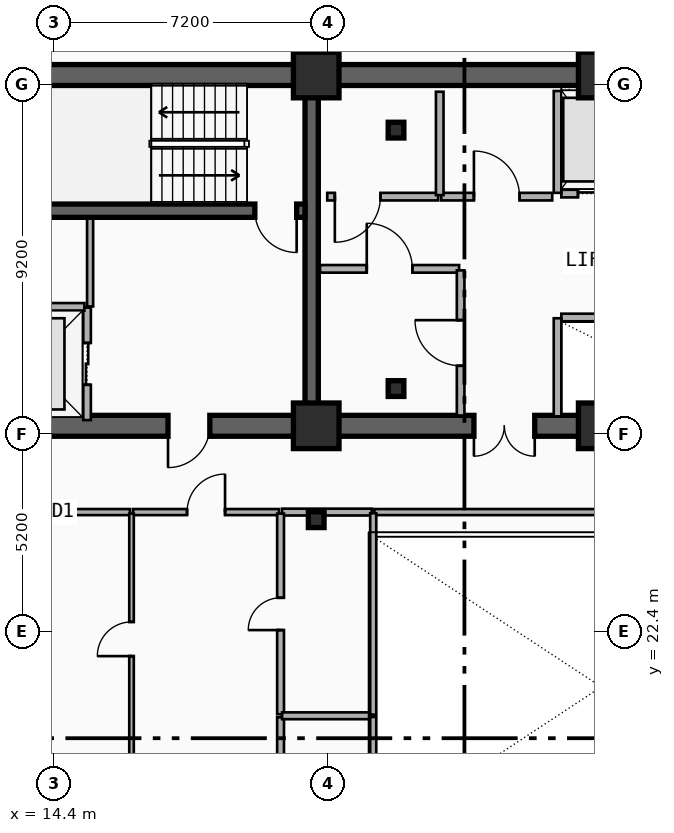
"""IFC4 building model, lengths in metres.
Left out: names, types, materials, properties, quantities, classifications, styles, units other than length and angle.
Written with IfcOpenShell. Run it as: python <this file> out.ifc"""

import sys

from ifc_helpers import new_model, si_unit, direction, frame, frame_2d, origin, origin_2d, place, context, subcontext, project, spatial, rectangle, i_section, extrude, element, fill, save


model = new_model("IFC4")
c1 = context("Model", 3, precision=1e-05, world=origin(), true_north=direction((0.0, 1.0)))
c2 = subcontext(c1, "Body", "Model", "MODEL_VIEW")
j1 = project(units=[si_unit("LENGTHUNIT", "METRE"), si_unit("PLANEANGLEUNIT", "RADIAN")], contexts=[c1])
p1 = place(None, origin())
s1 = spatial("IfcSite", under=j1, at=p1, CompositionType="ELEMENT")
p2 = place(p1, origin())
s2 = spatial("IfcBuilding", under=s1, at=p2, CompositionType="ELEMENT")
p3 = place(p2, frame((0.0, 0.0, 148.35)))
s3 = spatial("IfcBuildingStorey", under=s2, at=p3, CompositionType="ELEMENT", Elevation=148.35)
p4 = place(p3, frame((12.15, 37.05, 0.0), z_axis=(0.0, 0.0, 1.0), x_axis=(1.0, 0.0, 0.0)))
e1 = element("IfcWall", 1, at=p4, inside=s3, PredefinedType="SHEAR", context=c2, shape_type="SweptSolid", body=[
    extrude(rectangle(XDim=33.23, YDim=0.55, at=frame_2d((16.615, 0.0))), origin(), (0.0, 0.0, 1.0), 3.55),
])
p5 = place(p3, frame((21.18, 27.82, 0.0), z_axis=(0.0, 0.0, 1.0), x_axis=(-1.0, 0.0, 0.0)))
e2 = element("IfcWall", 2, at=p5, inside=s3, PredefinedType="SHEAR", context=c2, shape_type="SweptSolid", body=[
    extrude(rectangle(XDim=9.03, YDim=0.55, at=frame_2d((4.515, 0.0))), origin(), (0.0, 0.0, 1.0), 3.55),
])
p6 = place(p5, frame((2.68, 0.0, 0.0)))
e3 = element("IfcOpeningElement", 3, at=p6, cuts=e2, PredefinedType="OPENING", context=c2, shape_type="SweptSolid", body=[
    extrude(rectangle(XDim=1.1, YDim=2.15, at=frame_2d((0.55, 1.075))), frame((0.0, 0.285, 0.0), z_axis=(0.0, -1.0, 0.0), x_axis=(1.0, 0.0, 0.0)), (0.0, 0.0, 1.0), 0.57),
])
p7 = place(p3, frame((33.15, 27.82, 0.0), z_axis=(0.0, 0.0, 1.0), x_axis=(-1.0, 0.0, 0.0)))
e4 = element("IfcWall", 4, at=p7, inside=s3, PredefinedType="SHEAR", context=c2, shape_type="SweptSolid", body=[
    extrude(rectangle(XDim=11.97, YDim=0.55, at=frame_2d((5.985, 0.0))), origin(), (0.0, 0.0, 1.0), 3.55),
])
p8 = place(p7, frame((6.1, 0.0, 0.0)))
e5 = element("IfcOpeningElement", 5, at=p8, cuts=e4, PredefinedType="OPENING", context=c2, shape_type="SweptSolid", body=[
    extrude(rectangle(XDim=1.6, YDim=2.2, at=frame_2d((0.8, 1.1))), frame((0.0, 0.285, 0.0), z_axis=(0.0, -1.0, 0.0), x_axis=(1.0, 0.0, 0.0)), (0.0, 0.0, 1.0), 0.57),
])
p9 = place(p3, frame((21.18, 28.095, 0.0), z_axis=(0.0, 0.0, 1.0), x_axis=(0.0, 1.0, 0.0)))
e6 = element("IfcWall", 6, at=p9, inside=s3, PredefinedType="SHEAR", context=c2, shape_type="SweptSolid", body=[
    extrude(rectangle(XDim=8.68, YDim=0.35, at=frame_2d((4.34, 0.0))), origin(), (0.0, 0.0, 1.0), 3.55),
])
p10 = place(p3, frame((21.005, 33.48, 0.0), z_axis=(0.0, 0.0, 1.0), x_axis=(-1.0, 0.0, 0.0)))
e7 = element("IfcWall", 7, at=p10, inside=s3, PredefinedType="SHEAR", context=c2, shape_type="SweptSolid", body=[
    extrude(rectangle(XDim=8.58, YDim=0.35, at=frame_2d((4.29, 0.0))), origin(), (0.0, 0.0, 1.0), 3.55),
])
p11 = place(p10, frame((0.22, 0.0, 0.0)))
e8 = element("IfcOpeningElement", 8, at=p11, cuts=e7, PredefinedType="OPENING", context=c2, shape_type="SweptSolid", body=[
    extrude(rectangle(XDim=1.1, YDim=2.15, at=frame_2d((0.55, 1.075))), frame((0.0, 0.185, 0.0), z_axis=(0.0, -1.0, 0.0), x_axis=(1.0, 0.0, 0.0)), (0.0, 0.0, 1.0), 0.37),
])
for number, where, z_axis, x_axis in (
    (9, (23.4, 28.8, 0.0), (0.0, 0.0, 1.0), (1.0, 0.0, 0.0)),
    (10, (23.4, 35.6, 0.0), (0.0, 0.0, 1.0), (1.0, 0.0, 0.0)),
):
    element("IfcColumn", number, at=place(p3, frame(where, z_axis=z_axis, x_axis=x_axis)), inside=s3, PredefinedType="COLUMN", context=c2, shape_type="SweptSolid", body=[
        extrude(i_section(OverallWidth=0.413, OverallDepth=0.415, WebThickness=0.03, FlangeThickness=0.047, FilletRadius=0.015, at=origin_2d()), origin(), (0.0, 0.0, 1.0), 3.55),
    ])
for number, where, z_axis, x_axis in (
    (11, (21.3, 27.82, 0.0), (0.0, 0.0, 1.0), (1.0, 0.0, 0.0)),
    (12, (21.3, 37.05, 0.0), (0.0, 0.0, 1.0), (1.0, 0.0, 0.0)),
    (13, (28.8, 27.82, 0.0), (0.0, 0.0, 1.0), (1.0, 0.0, 0.0)),
    (14, (28.8, 37.05, 0.0), (0.0, 0.0, 1.0), (1.0, 0.0, 0.0)),
):
    element("IfcColumn", number, at=place(p3, frame(where, z_axis=z_axis, x_axis=x_axis)), inside=s3, PredefinedType="COLUMN", context=c2, shape_type="SweptSolid", body=[
        extrude(rectangle(XDim=1.2, YDim=1.2, at=origin_2d()), origin(), (0.0, 0.0, 1.0), 3.55),
    ])
p12 = place(p3, frame((21.3, 25.35, 0.0), z_axis=(0.0, 0.0, 1.0), x_axis=(1.0, 0.0, 0.0)))
e15 = element("IfcColumn", 15, at=p12, inside=s3, PredefinedType="COLUMN", context=c2, shape_type="SweptSolid", body=[
    extrude(i_section(OverallWidth=0.413, OverallDepth=0.415, WebThickness=0.03, FlangeThickness=0.047, FilletRadius=0.015, at=origin_2d()), origin(), (0.0, 0.0, 1.0), 3.55),
])
p13 = place(p3, frame((15.27, 27.97, 0.0), z_axis=(0.0, 0.0, 1.0), x_axis=(0.0, 1.0, 0.0)))
e16 = element("IfcWall", 16, at=p13, inside=s3, PredefinedType="PARTITIONING", context=c2, shape_type="SweptSolid", body=[
    extrude(rectangle(XDim=2.96, YDim=0.2, at=frame_2d((1.48, 0.0))), origin(), (0.0, 0.0, 1.0), 2.36),
])
p14 = place(p13, frame((0.93, 0.0, 0.0)))
e17 = element("IfcOpeningElement", 17, at=p14, cuts=e16, PredefinedType="OPENING", context=c2, shape_type="SweptSolid", body=[
    extrude(rectangle(XDim=1.1, YDim=2.15, at=frame_2d((0.55, 1.075))), frame((0.0, 0.11, 0.0), z_axis=(0.0, -1.0, 0.0), x_axis=(1.0, 0.0, 0.0)), (0.0, 0.0, 1.0), 0.22),
])
p15 = place(p3, frame((12.45, 30.95, 0.0), z_axis=(0.0, 0.0, 1.0), x_axis=(1.0, 0.0, 0.0)))
e18 = element("IfcWall", 18, at=p15, inside=s3, PredefinedType="PARTITIONING", context=c2, shape_type="SweptSolid", body=[
    extrude(rectangle(XDim=2.75, YDim=0.2, at=frame_2d((1.375, 0.0))), origin(), (0.0, 0.0, 1.0), 2.36),
])
p16 = place(p3, frame((27.75, 30.67, 0.0), z_axis=(0.0, 0.0, 1.0), x_axis=(1.0, 0.0, 0.0)))
e19 = element("IfcWall", 19, at=p16, inside=s3, PredefinedType="PARTITIONING", context=c2, shape_type="SweptSolid", body=[
    extrude(rectangle(XDim=1.975, YDim=0.2, at=frame_2d((0.988, 0.0))), origin(), (0.0, 0.0, 1.0), 2.36),
])
p17 = place(p3, frame((27.65, 28.07, 0.0), z_axis=(0.0, 0.0, 1.0), x_axis=(0.0, 1.0, 0.0)))
e20 = element("IfcWall", 20, at=p17, inside=s3, PredefinedType="PARTITIONING", context=c2, shape_type="SweptSolid", body=[
    extrude(rectangle(XDim=2.58, YDim=0.2, at=frame_2d((1.29, 0.0))), origin(), (0.0, 0.0, 1.0), 2.36),
])
p18 = place(p3, frame((27.75, 33.93, 0.0), z_axis=(0.0, 0.0, 1.0), x_axis=(1.0, 0.0, 0.0)))
e21 = element("IfcWall", 21, at=p18, inside=s3, PredefinedType="PARTITIONING", context=c2, shape_type="SweptSolid", body=[
    extrude(rectangle(XDim=1.975, YDim=0.2, at=frame_2d((0.988, 0.0))), origin(), (0.0, 0.0, 1.0), 2.36),
])
p19 = place(p18, frame((0.438, 0.0, 0.0)))
e22 = element("IfcOpeningElement", 22, at=p19, cuts=e21, PredefinedType="OPENING", context=c2, shape_type="SweptSolid", body=[
    extrude(rectangle(XDim=1.1, YDim=2.15, at=frame_2d((0.55, 1.075))), frame((0.0, 0.11, 0.0), z_axis=(0.0, -1.0, 0.0), x_axis=(1.0, 0.0, 0.0)), (0.0, 0.0, 1.0), 0.22),
])
p20 = place(p3, frame((27.65, 33.95, 0.0), z_axis=(0.0, 0.0, 1.0), x_axis=(0.0, 1.0, 0.0)))
e23 = element("IfcWall", 23, at=p20, inside=s3, PredefinedType="PARTITIONING", context=c2, shape_type="SweptSolid", body=[
    extrude(rectangle(XDim=2.68, YDim=0.2, at=frame_2d((1.34, 0.0))), origin(), (0.0, 0.0, 1.0), 2.36),
])
p21 = place(p3, frame((21.4, 31.95, 0.0), z_axis=(0.0, 0.0, 1.0), x_axis=(1.0, 0.0, 0.0)))
e24 = element("IfcWall", 24, at=p21, inside=s3, PredefinedType="PARTITIONING", context=c2, shape_type="SweptSolid", body=[
    extrude(rectangle(XDim=3.66, YDim=0.2, at=frame_2d((1.83, 0.0))), origin(), (0.0, 0.0, 1.0), 2.36),
])
p22 = place(p21, frame((1.23, 0.0, 0.0)))
e25 = element("IfcOpeningElement", 25, at=p22, cuts=e24, PredefinedType="OPENING", context=c2, shape_type="SweptSolid", body=[
    extrude(rectangle(XDim=1.2, YDim=2.15, at=frame_2d((0.6, 1.075))), frame((0.0, 0.11, 0.0), z_axis=(0.0, -1.0, 0.0), x_axis=(1.0, 0.0, 0.0)), (0.0, 0.0, 1.0), 0.22),
])
p23 = place(p3, frame((24.51, 33.85, 0.0), z_axis=(0.0, 0.0, 1.0), x_axis=(-1.0, 0.0, 0.0)))
e26 = element("IfcWall", 26, at=p23, inside=s3, PredefinedType="PARTITIONING", context=c2, shape_type="SweptSolid", body=[
    extrude(rectangle(XDim=2.92, YDim=0.2, at=frame_2d((1.46, 0.0))), origin(), (0.0, 0.0, 1.0), 2.36),
])
p24 = place(p23, frame((1.52, 0.0, 0.0)))
e27 = element("IfcOpeningElement", 27, at=p24, cuts=e26, PredefinedType="OPENING", context=c2, shape_type="SweptSolid", body=[
    extrude(rectangle(XDim=1.2, YDim=2.15, at=frame_2d((0.6, 1.075))), frame((0.0, 0.11, 0.0), z_axis=(0.0, -1.0, 0.0), x_axis=(1.0, 0.0, 0.0)), (0.0, 0.0, 1.0), 0.22),
])
p25 = place(p3, frame((24.59, 33.85, 0.0), z_axis=(0.0, 0.0, 1.0), x_axis=(1.0, 0.0, 0.0)))
e28 = element("IfcWall", 28, at=p25, inside=s3, PredefinedType="PARTITIONING", context=c2, shape_type="SweptSolid", body=[
    extrude(rectangle(XDim=2.92, YDim=0.2, at=frame_2d((1.46, 0.0))), origin(), (0.0, 0.0, 1.0), 3.29),
])
p26 = place(p25, frame((0.86, 0.0, 0.0)))
e29 = element("IfcOpeningElement", 29, at=p26, cuts=e28, PredefinedType="OPENING", context=c2, shape_type="SweptSolid", body=[
    extrude(rectangle(XDim=1.2, YDim=2.15, at=frame_2d((0.6, 1.075))), frame((0.0, 0.11, 0.0), z_axis=(0.0, -1.0, 0.0), x_axis=(1.0, 0.0, 0.0)), (0.0, 0.0, 1.0), 0.22),
])
p27 = place(p3, frame((25.1, 28.09, 0.0), z_axis=(0.0, 0.0, 1.0), x_axis=(0.0, 1.0, 0.0)))
e30 = element("IfcWall", 30, at=p27, inside=s3, PredefinedType="PARTITIONING", context=c2, shape_type="SweptSolid", body=[
    extrude(rectangle(XDim=3.82, YDim=0.2, at=frame_2d((1.91, 0.0))), origin(), (0.0, 0.0, 1.0), 2.67),
])
p28 = place(p27, frame((1.31, 0.0, 0.0)))
e31 = element("IfcOpeningElement", 31, at=p28, cuts=e30, PredefinedType="OPENING", context=c2, shape_type="SweptSolid", body=[
    extrude(rectangle(XDim=1.2, YDim=2.15, at=frame_2d((0.6, 1.075))), frame((0.0, 0.11, 0.0), z_axis=(0.0, -1.0, 0.0), x_axis=(1.0, 0.0, 0.0)), (0.0, 0.0, 1.0), 0.22),
])
p29 = place(p3, frame((24.55, 33.89, 0.0), z_axis=(0.0, 0.0, 1.0), x_axis=(0.0, 1.0, 0.0)))
e32 = element("IfcWall", 32, at=p29, inside=s3, PredefinedType="PARTITIONING", context=c2, shape_type="SweptSolid", body=[
    extrude(rectangle(XDim=2.72, YDim=0.2, at=frame_2d((1.36, 0.0))), origin(), (0.0, 0.0, 1.0), 3.29),
])
p30 = place(p3, frame((16.48, 25.55, 0.0), z_axis=(0.0, 0.0, 1.0), x_axis=(1.0, 0.0, 0.0)))
e33 = element("IfcWall", 33, at=p30, inside=s3, PredefinedType="PARTITIONING", context=c2, shape_type="SweptSolid", body=[
    extrude(rectangle(XDim=3.842, YDim=0.16, at=frame_2d((1.921, 0.0))), origin(), (0.0, 0.0, 1.0), 3.29),
])
p31 = place(p30, frame((1.421, 0.0, 0.0)))
e34 = element("IfcOpeningElement", 34, at=p31, cuts=e33, PredefinedType="OPENING", context=c2, shape_type="SweptSolid", body=[
    extrude(rectangle(XDim=1.0, YDim=2.15, at=frame_2d((0.5, 1.075))), frame((0.0, 0.09, 0.0), z_axis=(0.0, -1.0, 0.0), x_axis=(1.0, 0.0, 0.0)), (0.0, 0.0, 1.0), 0.18),
])
p32 = place(p3, frame((20.402, 25.55, 0.0), z_axis=(0.0, 0.0, 1.0), x_axis=(1.0, 0.0, 0.0)))
e35 = element("IfcWall", 35, at=p32, inside=s3, PredefinedType="PLUMBINGWALL", context=c2, shape_type="SweptSolid", body=[
    extrude(rectangle(XDim=2.358, YDim=0.18, at=frame_2d((1.179, 0.0))), origin(), (0.0, 0.0, 1.0), 2.36),
])
p33 = place(p3, frame((12.24, 25.55, 0.0), z_axis=(0.0, 0.0, 1.0), x_axis=(1.0, 0.0, 0.0)))
e36 = element("IfcWall", 36, at=p33, inside=s3, PredefinedType="PARTITIONING", context=c2, shape_type="SweptSolid", body=[
    extrude(rectangle(XDim=4.16, YDim=0.16, at=frame_2d((2.08, 0.0))), origin(), (0.0, 0.0, 1.0), 2.36),
])
p34 = place(p3, frame((20.362, 10.66, 0.0), z_axis=(0.0, 0.0, 1.0), x_axis=(0.0, 1.0, 0.0)))
e37 = element("IfcWall", 37, at=p34, inside=s3, PredefinedType="PLUMBINGWALL", context=c2, shape_type="SweptSolid", body=[
    extrude(rectangle(XDim=9.49, YDim=0.18, at=frame_2d((4.745, 0.0))), origin(), (0.0, 0.0, 1.0), 2.72),
])
p35 = place(p34, frame((4.245, 0.0, 0.0)))
e38 = element("IfcOpeningElement", 38, at=p35, cuts=e37, PredefinedType="OPENING", context=c2, shape_type="SweptSolid", body=[
    extrude(rectangle(XDim=1.0, YDim=2.15, at=frame_2d((0.5, 1.075))), frame((0.0, 0.1, 0.0), z_axis=(0.0, -1.0, 0.0), x_axis=(1.0, 0.0, 0.0)), (0.0, 0.0, 1.0), 0.2),
])
p36 = place(p3, frame((20.362, 20.23, 0.0), z_axis=(0.0, 0.0, 1.0), x_axis=(0.0, 1.0, 0.0)))
e39 = element("IfcWall", 39, at=p36, inside=s3, PredefinedType="PLUMBINGWALL", context=c2, shape_type="SweptSolid", body=[
    extrude(rectangle(XDim=5.28, YDim=0.18, at=frame_2d((2.64, 0.0))), origin(), (0.0, 0.0, 1.0), 2.72),
])
p37 = place(p36, frame((2.215, 0.0, 0.0)))
e40 = element("IfcOpeningElement", 40, at=p37, cuts=e39, PredefinedType="OPENING", context=c2, shape_type="SweptSolid", body=[
    extrude(rectangle(XDim=0.85, YDim=2.1, at=frame_2d((0.425, 1.05))), frame((0.0, 0.1, 0.0), z_axis=(0.0, -1.0, 0.0), x_axis=(1.0, 0.0, 0.0)), (0.0, 0.0, 1.0), 0.2),
])
p38 = place(p3, frame((16.44, 18.91, 0.0), z_axis=(0.0, 0.0, 1.0), x_axis=(0.0, 1.0, 0.0)))
e41 = element("IfcWall", 41, at=p38, inside=s3, PredefinedType="PARTITIONING", context=c2, shape_type="SweptSolid", body=[
    extrude(rectangle(XDim=6.6, YDim=0.12, at=frame_2d((3.3, 0.0))), origin(), (0.0, 0.0, 1.0), 2.72),
])
p39 = place(p38, frame((2.85, 0.0, 0.0)))
e42 = element("IfcOpeningElement", 42, at=p39, cuts=e41, PredefinedType="OPENING", context=c2, shape_type="SweptSolid", body=[
    extrude(rectangle(XDim=0.9, YDim=2.1, at=frame_2d((0.45, 1.05))), frame((0.0, 0.07, 0.0), z_axis=(0.0, -1.0, 0.0), x_axis=(1.0, 0.0, 0.0)), (0.0, 0.0, 1.0), 0.14),
])
p40 = place(p3, frame((20.402, 20.19, 0.0), z_axis=(0.0, 0.0, 1.0), x_axis=(1.0, 0.0, 0.0)))
e43 = element("IfcWall", 43, at=p40, inside=s3, PredefinedType="PLUMBINGWALL", context=c2, shape_type="SweptSolid", body=[
    extrude(rectangle(XDim=2.358, YDim=0.18, at=frame_2d((1.179, 0.0))), origin(), (0.0, 0.0, 1.0), 2.36),
])
p41 = place(p3, frame((15.35, 30.96, 0.0), z_axis=(0.0, 0.0, 1.0), x_axis=(0.0, 1.0, 0.0)))
e44 = element("IfcWall", 44, at=p41, inside=s3, PredefinedType="PARTITIONING", context=c2, shape_type="SweptSolid", body=[
    extrude(rectangle(XDim=2.31, YDim=0.16, at=frame_2d((1.155, 0.0))), origin(), (0.0, 0.0, 1.0), 3.29),
])
p42 = place(p3, frame((22.83, 25.55, 0.0), z_axis=(0.0, 0.0, 1.0), x_axis=(1.0, 0.0, 0.0)))
e45 = element("IfcWall", 45, at=p42, inside=s3, PredefinedType="PARTITIONING", context=c2, shape_type="SweptSolid", body=[
    extrude(rectangle(XDim=13.49, YDim=0.16, at=frame_2d((6.745, 0.0))), origin(), (0.0, 0.0, 1.0), 2.36),
])
p43 = place(p3, frame((22.8, 17.03, 0.0), z_axis=(0.0, 0.0, 1.0), x_axis=(0.0, 1.0, 0.0)))
e46 = element("IfcWall", 46, at=p43, inside=s3, PredefinedType="PARTITIONING", context=c2, shape_type="SweptSolid", body=[
    extrude(rectangle(XDim=3.13, YDim=0.16, at=frame_2d((1.565, 0.0))), origin(), (0.0, 0.0, 1.0), 2.73),
])
p44 = place(p3, frame((22.8, 20.22, 0.0), z_axis=(0.0, 0.0, 1.0), x_axis=(0.0, 1.0, 0.0)))
e47 = element("IfcWall", 47, at=p44, inside=s3, PredefinedType="PARTITIONING", context=c2, shape_type="SweptSolid", body=[
    extrude(rectangle(XDim=5.3, YDim=0.16, at=frame_2d((2.65, 0.0))), origin(), (0.0, 0.0, 1.0), 3.29),
])
p45 = place(p14, origin())
e48 = element("IfcDoor", 48, at=p45, inside=s3, OperationType="DOUBLE_DOOR_SLIDING", PredefinedType="DOOR", context=c2, shape_type="SweptSolid", body=[
    extrude(rectangle(XDim=1.1, YDim=2.15, at=frame_2d((0.55, 1.075))), frame((0.0, 0.025, 0.0), z_axis=(0.0, -1.0, 0.0), x_axis=(1.0, 0.0, 0.0)), (0.0, 0.0, 1.0), 0.05),
])
fill(e17, e48)
p46 = place(p19, origin())
e49 = element("IfcDoor", 49, at=p46, inside=s3, OperationType="DOUBLE_DOOR_SLIDING", PredefinedType="DOOR", context=c2, shape_type="SweptSolid", body=[
    extrude(rectangle(XDim=1.1, YDim=2.15, at=frame_2d((0.55, 1.075))), frame((0.0, 0.025, 0.0), z_axis=(0.0, -1.0, 0.0), x_axis=(1.0, 0.0, 0.0)), (0.0, 0.0, 1.0), 0.05),
])
fill(e22, e49)
p47 = place(p11, origin())
e50 = element("IfcDoor", 50, at=p47, inside=s3, OperationType="SINGLE_SWING_LEFT", PredefinedType="DOOR", context=c2, shape_type="SweptSolid", body=[
    extrude(rectangle(XDim=1.1, YDim=2.15, at=frame_2d((0.55, 1.075))), frame((0.0, 0.025, 0.0), z_axis=(0.0, -1.0, 0.0), x_axis=(1.0, 0.0, 0.0)), (0.0, 0.0, 1.0), 0.05),
])
fill(e8, e50)
p48 = place(p6, origin())
e51 = element("IfcDoor", 51, at=p48, inside=s3, OperationType="SINGLE_SWING_RIGHT", PredefinedType="DOOR", context=c2, shape_type="SweptSolid", body=[
    extrude(rectangle(XDim=1.1, YDim=2.15, at=frame_2d((0.55, 1.075))), frame((0.0, 0.025, 0.0), z_axis=(0.0, -1.0, 0.0), x_axis=(1.0, 0.0, 0.0)), (0.0, 0.0, 1.0), 0.05),
])
fill(e3, e51)
p49 = place(p8, origin())
e52 = element("IfcDoor", 52, at=p49, inside=s3, OperationType="SINGLE_SWING_LEFT", PredefinedType="DOOR", context=c2, shape_type="SweptSolid", body=[
    extrude(rectangle(XDim=1.6, YDim=2.2, at=frame_2d((0.8, 1.1))), frame((0.0, 0.025, 0.0), z_axis=(0.0, -1.0, 0.0), x_axis=(1.0, 0.0, 0.0)), (0.0, 0.0, 1.0), 0.05),
])
fill(e5, e52)
p50 = place(p22, origin())
e53 = element("IfcDoor", 53, at=p50, inside=s3, OperationType="SINGLE_SWING_LEFT", PredefinedType="DOOR", context=c2, shape_type="SweptSolid", body=[
    extrude(rectangle(XDim=1.2, YDim=2.15, at=frame_2d((0.6, 1.075))), frame((0.0, 0.025, 0.0), z_axis=(0.0, -1.0, 0.0), x_axis=(1.0, 0.0, 0.0)), (0.0, 0.0, 1.0), 0.05),
])
fill(e25, e53)
p51 = place(p24, origin())
e54 = element("IfcDoor", 54, at=p51, inside=s3, OperationType="SINGLE_SWING_RIGHT", PredefinedType="DOOR", context=c2, shape_type="SweptSolid", body=[
    extrude(rectangle(XDim=1.2, YDim=2.15, at=frame_2d((0.6, 1.075))), frame((0.0, 0.025, 0.0), z_axis=(0.0, -1.0, 0.0), x_axis=(1.0, 0.0, 0.0)), (0.0, 0.0, 1.0), 0.05),
])
fill(e27, e54)
p52 = place(p26, origin())
e55 = element("IfcDoor", 55, at=p52, inside=s3, OperationType="SINGLE_SWING_LEFT", PredefinedType="DOOR", context=c2, shape_type="SweptSolid", body=[
    extrude(rectangle(XDim=1.2, YDim=2.15, at=frame_2d((0.6, 1.075))), frame((0.0, 0.025, 0.0), z_axis=(0.0, -1.0, 0.0), x_axis=(1.0, 0.0, 0.0)), (0.0, 0.0, 1.0), 0.05),
])
fill(e29, e55)
p53 = place(p28, origin())
e56 = element("IfcDoor", 56, at=p53, inside=s3, OperationType="SINGLE_SWING_RIGHT", PredefinedType="DOOR", context=c2, shape_type="SweptSolid", body=[
    extrude(rectangle(XDim=1.2, YDim=2.15, at=frame_2d((0.6, 1.075))), frame((0.0, 0.025, 0.0), z_axis=(0.0, -1.0, 0.0), x_axis=(1.0, 0.0, 0.0)), (0.0, 0.0, 1.0), 0.05),
])
fill(e31, e56)
p54 = place(p31, origin())
e57 = element("IfcDoor", 57, at=p54, inside=s3, OperationType="SINGLE_SWING_RIGHT", PredefinedType="DOOR", context=c2, shape_type="SweptSolid", body=[
    extrude(rectangle(XDim=1.0, YDim=2.15, at=frame_2d((0.5, 1.075))), frame((0.0, 0.025, 0.0), z_axis=(0.0, -1.0, 0.0), x_axis=(1.0, 0.0, 0.0)), (0.0, 0.0, 1.0), 0.05),
])
fill(e34, e57)
p55 = place(p37, origin())
e58 = element("IfcDoor", 58, at=p55, inside=s3, OperationType="SINGLE_SWING_LEFT", PredefinedType="DOOR", context=c2, shape_type="SweptSolid", body=[
    extrude(rectangle(XDim=0.85, YDim=2.1, at=frame_2d((0.425, 1.05))), frame((0.0, 0.025, 0.0), z_axis=(0.0, -1.0, 0.0), x_axis=(1.0, 0.0, 0.0)), (0.0, 0.0, 1.0), 0.05),
])
fill(e40, e58)
p56 = place(p39, origin())
e59 = element("IfcDoor", 59, at=p56, inside=s3, OperationType="SINGLE_SWING_LEFT", PredefinedType="DOOR", context=c2, shape_type="SweptSolid", body=[
    extrude(rectangle(XDim=0.9, YDim=2.1, at=frame_2d((0.45, 1.05))), frame((0.0, 0.025, 0.0), z_axis=(0.0, -1.0, 0.0), x_axis=(1.0, 0.0, 0.0)), (0.0, 0.0, 1.0), 0.05),
])
fill(e42, e59)
save(model, sys.argv[1])
